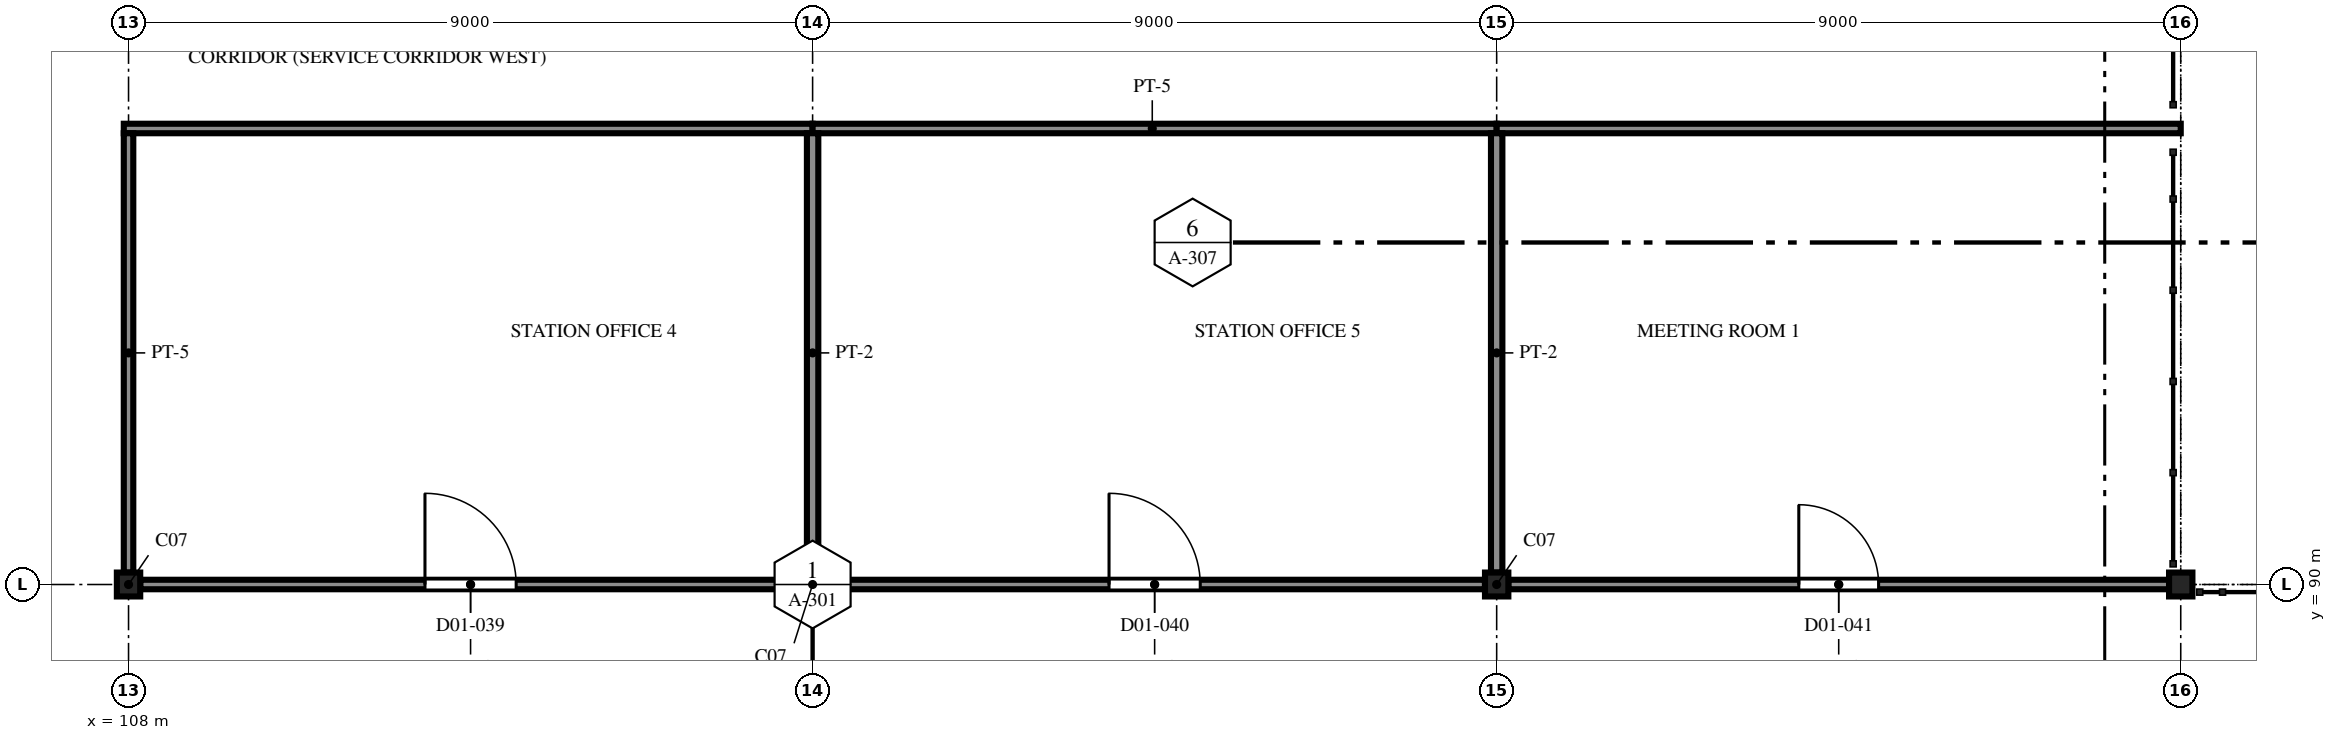
"""IFC4 building model, lengths in metres.
Left out: names, types, materials, properties, quantities, classifications, styles, units other than length and angle.
Written with IfcOpenShell. Run it as: python <this file> out.ifc"""

import sys

from ifc_helpers import new_model, si_unit, direction, frame, frame_2d, origin, origin_2d, place, context, subcontext, project, spatial, polyline, rectangle, i_section, outline, extrude, element, fill, save


model = new_model("IFC4")
c1 = context("Model", 3, precision=1e-05, world=origin(), true_north=direction((0.0, 1.0)))
c2 = subcontext(c1, "Body", "Model", "MODEL_VIEW")
j1 = project(units=[si_unit("LENGTHUNIT", "METRE"), si_unit("PLANEANGLEUNIT", "RADIAN")], contexts=[c1])
p1 = place(None, origin())
s1 = spatial("IfcSite", under=j1, at=p1, CompositionType="ELEMENT")
p2 = place(p1, origin())
s2 = spatial("IfcBuilding", under=s1, at=p2, CompositionType="ELEMENT")
p3 = place(p2, frame((0.0, 0.0, 7.5)))
s3 = spatial("IfcBuildingStorey", under=s2, at=p3, CompositionType="ELEMENT", Elevation=7.5)
for number, where, z_axis, x_axis in (
    (1, (108.0, 90.0, 0.0), (0.0, 0.0, 1.0), (1.0, 0.0, 0.0)),
    (2, (117.0, 90.0, 0.0), (0.0, 0.0, 1.0), (1.0, 0.0, 0.0)),
    (3, (126.0, 90.0, 0.0), (0.0, 0.0, 1.0), (1.0, 0.0, 0.0)),
    (4, (135.0, 90.0, 0.0), (0.0, 0.0, 1.0), (1.0, 0.0, 0.0)),
):
    element("IfcColumn", number, at=place(p3, frame(where, z_axis=z_axis, x_axis=x_axis)), inside=s3, PredefinedType="COLUMN", context=c2, shape_type="SweptSolid", body=[
        extrude(i_section(OverallWidth=0.307, OverallDepth=0.314, WebThickness=0.012, FlangeThickness=0.019, FilletRadius=0.015, at=origin_2d()), origin(), (0.0, 0.0, 1.0), 4.2),
    ])
p4 = place(p3, frame((117.0, 96.0, 0.0), z_axis=(0.0, 0.0, 1.0), x_axis=(-1.0, 0.0, 0.0)))
e5 = element("IfcWall", 5, at=p4, inside=s3, PredefinedType="PARTITIONING", context=c2, shape_type="SweptSolid", body=[
    extrude(rectangle(XDim=9.062, YDim=0.125, at=frame_2d((4.531, 0.0))), origin(), (0.0, 0.0, 1.0), 3.307),
])
for number, where, z_axis, x_axis in (
    (6, (126.0, 96.0, 0.0), (0.0, 0.0, 1.0), (-1.0, 0.0, 0.0)),
    (7, (135.0, 96.0, 0.0), (0.0, 0.0, 1.0), (-1.0, 0.0, 0.0)),
):
    element("IfcWall", number, at=place(p3, frame(where, z_axis=z_axis, x_axis=x_axis)), inside=s3, PredefinedType="PARTITIONING", context=c2, shape_type="SweptSolid", body=[
        extrude(rectangle(XDim=9.0, YDim=0.125, at=frame_2d((4.5, 0.0))), origin(), (0.0, 0.0, 1.0), 3.307),
    ])
p5 = place(p3, frame((108.154, 90.0, 0.0), z_axis=(0.0, 0.0, 1.0), x_axis=(1.0, 0.0, 0.0)))
e8 = element("IfcWall", 8, at=p5, inside=s3, PredefinedType="PARTITIONING", context=c2, shape_type="SweptSolid", body=[
    extrude(rectangle(XDim=8.692, YDim=0.125, at=frame_2d((4.346, 0.0))), origin(), (0.0, 0.0, 1.0), 3.307),
])
p6 = place(p5, frame((3.746, 0.0, 0.0)))
e9 = element("IfcOpeningElement", 9, at=p6, cuts=e8, PredefinedType="OPENING", context=c2, shape_type="SweptSolid", body=[
    extrude(rectangle(XDim=1.2, YDim=2.1, at=frame_2d((0.6, 1.05))), frame((0.0, 0.073, 0.0), z_axis=(0.0, -1.0, 0.0), x_axis=(1.0, 0.0, 0.0)), (0.0, 0.0, 1.0), 0.145),
])
p7 = place(p3, frame((117.154, 90.0, 0.0), z_axis=(0.0, 0.0, 1.0), x_axis=(1.0, 0.0, 0.0)))
e10 = element("IfcWall", 10, at=p7, inside=s3, PredefinedType="PARTITIONING", context=c2, shape_type="SweptSolid", body=[
    extrude(rectangle(XDim=8.692, YDim=0.125, at=frame_2d((4.346, 0.0))), origin(), (0.0, 0.0, 1.0), 3.307),
])
p8 = place(p7, frame((3.746, 0.0, 0.0)))
e11 = element("IfcOpeningElement", 11, at=p8, cuts=e10, PredefinedType="OPENING", context=c2, shape_type="SweptSolid", body=[
    extrude(rectangle(XDim=1.2, YDim=2.1, at=frame_2d((0.6, 1.05))), frame((0.0, 0.073, 0.0), z_axis=(0.0, -1.0, 0.0), x_axis=(1.0, 0.0, 0.0)), (0.0, 0.0, 1.0), 0.145),
])
p9 = place(p3, frame((126.154, 90.0, 0.0), z_axis=(0.0, 0.0, 1.0), x_axis=(1.0, 0.0, 0.0)))
e12 = element("IfcWall", 12, at=p9, inside=s3, PredefinedType="PARTITIONING", context=c2, shape_type="SweptSolid", body=[
    extrude(rectangle(XDim=8.692, YDim=0.125, at=frame_2d((4.346, 0.0))), origin(), (0.0, 0.0, 1.0), 3.307),
])
p10 = place(p9, frame((3.821, 0.0, 0.0)))
e13 = element("IfcOpeningElement", 13, at=p10, cuts=e12, PredefinedType="OPENING", context=c2, shape_type="SweptSolid", body=[
    extrude(rectangle(XDim=1.05, YDim=2.1, at=frame_2d((0.525, 1.05))), frame((0.0, 0.073, 0.0), z_axis=(0.0, -1.0, 0.0), x_axis=(1.0, 0.0, 0.0)), (0.0, 0.0, 1.0), 0.145),
])
p11 = place(p3, frame((108.0, 95.938, 0.0), z_axis=(0.0, 0.0, 1.0), x_axis=(0.0, -1.0, 0.0)))
e14 = element("IfcWall", 14, at=p11, inside=s3, PredefinedType="PARTITIONING", context=c2, shape_type="SweptSolid", body=[
    extrude(rectangle(XDim=5.78, YDim=0.125, at=frame_2d((2.89, 0.0))), origin(), (0.0, 0.0, 1.0), 3.307),
])
for number, where, z_axis, x_axis in (
    (15, (117.0, 95.938, 0.0), (0.0, 0.0, 1.0), (0.0, -1.0, 0.0)),
    (16, (126.0, 95.938, 0.0), (0.0, 0.0, 1.0), (0.0, -1.0, 0.0)),
):
    element("IfcWall", number, at=place(p3, frame(where, z_axis=z_axis, x_axis=x_axis)), inside=s3, PredefinedType="PARTITIONING", context=c2, shape_type="SweptSolid", body=[
        extrude(rectangle(XDim=5.78, YDim=0.15, at=frame_2d((2.89, 0.0))), origin(), (0.0, 0.0, 1.0), 3.307),
    ])
p12 = place(p6, origin())
e17 = element("IfcDoor", 17, at=p12, inside=s3, OperationType="DOUBLE_DOOR_SINGLE_SWING", PredefinedType="DOOR", context=c2, shape_type="SweptSolid", body=[
    extrude(outline(polyline([(0.0, 0.0), (0.07, 0.0), (0.07, 2.03), (1.13, 2.03), (1.13, 0.0), (1.2, 0.0), (1.2, 2.1), (0.0, 2.1), (0.0, 0.0)])), frame((0.0, 0.025, 0.0), z_axis=(0.0, -1.0, 0.0), x_axis=(1.0, 0.0, 0.0)), (0.0, 0.0, 1.0), 0.05),
    extrude(outline(polyline([(0.074, 0.01), (0.597, 0.01), (0.597, 2.026), (0.074, 2.026), (0.074, 0.01)]), holes=[polyline([(0.178, 0.373), (0.492, 0.373), (0.492, 1.784), (0.178, 1.784), (0.178, 0.373)])]), frame((0.0, 0.017, 0.0), z_axis=(0.0, -1.0, 0.0), x_axis=(1.0, 0.0, 0.0)), (0.0, 0.0, 1.0), 0.035),
    extrude(rectangle(XDim=0.314, YDim=1.411, at=frame_2d((0.335, 1.079))), frame((0.0, 0.009, 0.0), z_axis=(0.0, -1.0, 0.0), x_axis=(1.0, 0.0, 0.0)), (0.0, 0.0, 1.0), 0.017),
    extrude(outline(polyline([(0.603, 0.01), (1.126, 0.01), (1.126, 2.026), (0.603, 2.026), (0.603, 0.01)]), holes=[polyline([(0.708, 0.373), (1.021, 0.373), (1.021, 1.784), (0.708, 1.784), (0.708, 0.373)])]), frame((0.0, 0.017, 0.0), z_axis=(0.0, -1.0, 0.0), x_axis=(1.0, 0.0, 0.0)), (0.0, 0.0, 1.0), 0.035),
    extrude(rectangle(XDim=0.314, YDim=1.411, at=frame_2d((0.865, 1.079))), frame((0.0, 0.009, 0.0), z_axis=(0.0, -1.0, 0.0), x_axis=(1.0, 0.0, 0.0)), (0.0, 0.0, 1.0), 0.017),
])
fill(e9, e17)
p13 = place(p8, origin())
e18 = element("IfcDoor", 18, at=p13, inside=s3, OperationType="DOUBLE_DOOR_SINGLE_SWING", PredefinedType="DOOR", context=c2, shape_type="SweptSolid", body=[
    extrude(outline(polyline([(0.0, 0.0), (0.07, 0.0), (0.07, 2.03), (1.13, 2.03), (1.13, 0.0), (1.2, 0.0), (1.2, 2.1), (0.0, 2.1), (0.0, 0.0)])), frame((0.0, 0.025, 0.0), z_axis=(0.0, -1.0, 0.0), x_axis=(1.0, 0.0, 0.0)), (0.0, 0.0, 1.0), 0.05),
    extrude(outline(polyline([(0.074, 0.01), (0.597, 0.01), (0.597, 2.026), (0.074, 2.026), (0.074, 0.01)]), holes=[polyline([(0.178, 0.373), (0.492, 0.373), (0.492, 1.784), (0.178, 1.784), (0.178, 0.373)])]), frame((0.0, 0.017, 0.0), z_axis=(0.0, -1.0, 0.0), x_axis=(1.0, 0.0, 0.0)), (0.0, 0.0, 1.0), 0.035),
    extrude(rectangle(XDim=0.314, YDim=1.411, at=frame_2d((0.335, 1.079))), frame((0.0, 0.009, 0.0), z_axis=(0.0, -1.0, 0.0), x_axis=(1.0, 0.0, 0.0)), (0.0, 0.0, 1.0), 0.017),
    extrude(outline(polyline([(0.603, 0.01), (1.126, 0.01), (1.126, 2.026), (0.603, 2.026), (0.603, 0.01)]), holes=[polyline([(0.708, 0.373), (1.021, 0.373), (1.021, 1.784), (0.708, 1.784), (0.708, 0.373)])]), frame((0.0, 0.017, 0.0), z_axis=(0.0, -1.0, 0.0), x_axis=(1.0, 0.0, 0.0)), (0.0, 0.0, 1.0), 0.035),
    extrude(rectangle(XDim=0.314, YDim=1.411, at=frame_2d((0.865, 1.079))), frame((0.0, 0.009, 0.0), z_axis=(0.0, -1.0, 0.0), x_axis=(1.0, 0.0, 0.0)), (0.0, 0.0, 1.0), 0.017),
])
fill(e11, e18)
p14 = place(p10, origin())
e19 = element("IfcDoor", 19, at=p14, inside=s3, OperationType="SINGLE_SWING_LEFT", PredefinedType="DOOR", context=c2, shape_type="SweptSolid", body=[
    extrude(outline(polyline([(0.0, 0.0), (0.07, 0.0), (0.07, 2.03), (0.98, 2.03), (0.98, 0.0), (1.05, 0.0), (1.05, 2.1), (0.0, 2.1), (0.0, 0.0)])), frame((0.0, 0.025, 0.0), z_axis=(0.0, -1.0, 0.0), x_axis=(1.0, 0.0, 0.0)), (0.0, 0.0, 1.0), 0.05),
    extrude(outline(polyline([(0.074, 0.01), (0.976, 0.01), (0.976, 2.026), (0.074, 2.026), (0.074, 0.01)]), holes=[polyline([(0.194, 0.16), (0.856, 0.16), (0.856, 1.01), (0.194, 1.01), (0.194, 0.16)]), polyline([(0.375, 1.16), (0.675, 1.16), (0.675, 1.76), (0.375, 1.76), (0.375, 1.16)])]), frame((0.0, 0.017, 0.0), z_axis=(0.0, -1.0, 0.0), x_axis=(1.0, 0.0, 0.0)), (0.0, 0.0, 1.0), 0.035),
    extrude(rectangle(XDim=0.662, YDim=0.85, at=frame_2d((0.525, 0.585))), frame((0.0, 0.009, 0.0), z_axis=(0.0, -1.0, 0.0), x_axis=(1.0, 0.0, 0.0)), (0.0, 0.0, 1.0), 0.017),
    extrude(rectangle(XDim=0.3, YDim=0.6, at=frame_2d((0.525, 1.46))), frame((0.0, 0.006, 0.0), z_axis=(0.0, -1.0, 0.0), x_axis=(1.0, 0.0, 0.0)), (0.0, 0.0, 1.0), 0.012),
])
fill(e13, e19)
save(model, sys.argv[1])
